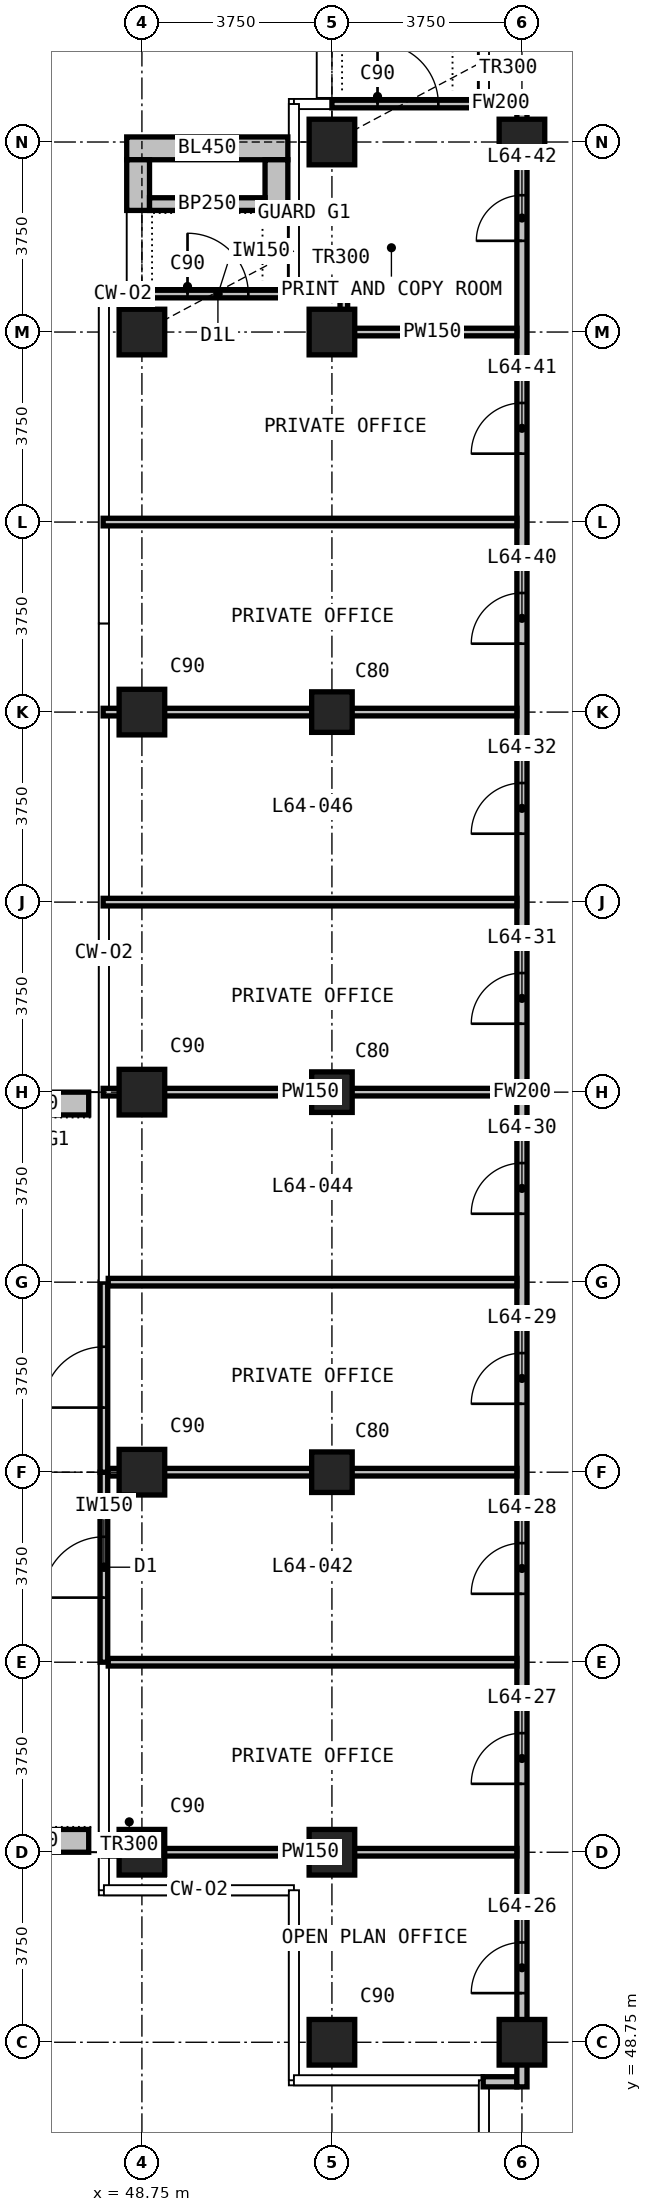
"""IFC4 building model, lengths in metres.
Left out: names, types, materials, properties, quantities, classifications, styles, units other than length and angle.
Written with IfcOpenShell. Run it as: python <this file> out.ifc"""

import sys

from ifc_helpers import new_model, si_unit, direction, frame, frame_2d, origin, origin_2d, place, context, subcontext, project, spatial, rectangle, extrude, element, fill, save


model = new_model("IFC4")
c1 = context("Model", 3, precision=1e-05, world=origin(), true_north=direction((0.0, 1.0)))
c2 = subcontext(c1, "Body", "Model", "MODEL_VIEW")
j1 = project(units=[si_unit("LENGTHUNIT", "METRE"), si_unit("PLANEANGLEUNIT", "RADIAN")], contexts=[c1])
p1 = place(None, origin())
s1 = spatial("IfcSite", under=j1, at=p1, CompositionType="ELEMENT")
p2 = place(p1, origin())
s2 = spatial("IfcBuilding", under=s1, at=p2, CompositionType="ELEMENT")
p3 = place(p2, frame((0.0, 0.0, 246.3)))
s3 = spatial("IfcBuildingStorey", under=s2, at=p3, CompositionType="ELEMENT", Elevation=246.3)
for number, where, z_axis, x_axis in (
    (1, (48.75, 52.5, 0.0), (0.0, 0.0, 1.0), (1.0, 0.0, 0.0)),
    (2, (48.75, 60.0, 0.0), (0.0, 0.0, 1.0), (1.0, 0.0, 0.0)),
    (3, (48.75, 67.5, 0.0), (0.0, 0.0, 1.0), (1.0, 0.0, 0.0)),
    (4, (48.75, 75.0, 0.0), (0.0, 0.0, 1.0), (1.0, 0.0, 0.0)),
    (5, (48.75, 82.5, 0.0), (0.0, 0.0, 1.0), (1.0, 0.0, 0.0)),
    (6, (52.5, 48.75, 0.0), (0.0, 0.0, 1.0), (1.0, 0.0, 0.0)),
    (7, (52.5, 52.5, 0.0), (0.0, 0.0, 1.0), (1.0, 0.0, 0.0)),
):
    element("IfcColumn", number, at=place(p3, frame(where, z_axis=z_axis, x_axis=x_axis)), inside=s3, PredefinedType="COLUMN", context=c2, shape_type="SweptSolid", body=[
        extrude(rectangle(XDim=0.9, YDim=0.9, at=origin_2d()), origin(), (0.0, 0.0, 1.0), 3.6),
    ])
for number, where, z_axis, x_axis in (
    (8, (52.5, 60.0, 0.0), (0.0, 0.0, 1.0), (1.0, 0.0, 0.0)),
    (9, (52.5, 67.5, 0.0), (0.0, 0.0, 1.0), (1.0, 0.0, 0.0)),
    (10, (52.5, 75.0, 0.0), (0.0, 0.0, 1.0), (1.0, 0.0, 0.0)),
):
    element("IfcColumn", number, at=place(p3, frame(where, z_axis=z_axis, x_axis=x_axis)), inside=s3, PredefinedType="COLUMN", context=c2, shape_type="SweptSolid", body=[
        extrude(rectangle(XDim=0.8, YDim=0.8, at=origin_2d()), origin(), (0.0, 0.0, 1.0), 3.6),
    ])
for number, where, z_axis, x_axis in (
    (11, (52.5, 82.5, 0.0), (0.0, 0.0, 1.0), (1.0, 0.0, 0.0)),
    (12, (52.5, 86.25, 0.0), (0.0, 0.0, 1.0), (1.0, 0.0, 0.0)),
    (13, (56.25, 48.75, 0.0), (0.0, 0.0, 1.0), (1.0, 0.0, 0.0)),
    (14, (56.25, 86.25, 0.0), (0.0, 0.0, 1.0), (1.0, 0.0, 0.0)),
):
    element("IfcColumn", number, at=place(p3, frame(where, z_axis=z_axis, x_axis=x_axis)), inside=s3, PredefinedType="COLUMN", context=c2, shape_type="SweptSolid", body=[
        extrude(rectangle(XDim=0.9, YDim=0.9, at=origin_2d()), origin(), (0.0, 0.0, 1.0), 3.6),
    ])
p4 = place(p3, frame((52.5, 87.0, 0.0), z_axis=(0.0, 0.0, 1.0), x_axis=(1.0, 0.0, 0.0)))
e15 = element("IfcWall", 15, at=p4, inside=s3, PredefinedType="SOLIDWALL", context=c2, shape_type="SweptSolid", body=[
    extrude(rectangle(XDim=3.0, YDim=0.15, at=frame_2d((1.5, 0.0))), origin(), (0.0, 0.0, 1.0), 3.3),
])
p5 = place(p4, frame((0.9, 0.0, 0.0)))
e16 = element("IfcOpeningElement", 16, at=p5, cuts=e15, PredefinedType="OPENING", context=c2, shape_type="SweptSolid", body=[
    extrude(rectangle(XDim=1.2, YDim=2.0, at=frame_2d((0.6, 1.0))), frame((0.0, 0.085, 0.0), z_axis=(0.0, -1.0, 0.0), x_axis=(1.0, 0.0, 0.0)), (0.0, 0.0, 1.0), 0.17),
])
p6 = place(p3, frame((48.75, 83.25, 0.0), z_axis=(0.0, 0.0, 1.0), x_axis=(1.0, 0.0, 0.0)))
e17 = element("IfcWall", 17, at=p6, inside=s3, PredefinedType="SOLIDWALL", context=c2, shape_type="SweptSolid", body=[
    extrude(rectangle(XDim=3.0, YDim=0.15, at=frame_2d((1.5, 0.0))), origin(), (0.0, 0.0, 1.0), 3.3),
])
p7 = place(p6, frame((0.9, 0.0, 0.0)))
e18 = element("IfcOpeningElement", 18, at=p7, cuts=e17, PredefinedType="OPENING", context=c2, shape_type="SweptSolid", body=[
    extrude(rectangle(XDim=1.2, YDim=2.0, at=frame_2d((0.6, 1.0))), frame((0.0, 0.085, 0.0), z_axis=(0.0, -1.0, 0.0), x_axis=(1.0, 0.0, 0.0)), (0.0, 0.0, 1.0), 0.17),
])
p8 = place(p3, frame((48.0, 56.25, 0.0), z_axis=(0.0, 0.0, 1.0), x_axis=(0.0, 1.0, 0.0)))
e19 = element("IfcWall", 19, at=p8, inside=s3, PredefinedType="SOLIDWALL", context=c2, shape_type="SweptSolid", body=[
    extrude(rectangle(XDim=3.75, YDim=0.15, at=frame_2d((1.875, 0.0))), origin(), (0.0, 0.0, 1.0), 3.3),
])
p9 = place(p8, frame((1.275, 0.0, 0.0)))
e20 = element("IfcOpeningElement", 20, at=p9, cuts=e19, PredefinedType="OPENING", context=c2, shape_type="SweptSolid", body=[
    extrude(rectangle(XDim=1.2, YDim=2.4, at=frame_2d((0.6, 1.2))), frame((0.0, 0.085, 0.0), z_axis=(0.0, -1.0, 0.0), x_axis=(1.0, 0.0, 0.0)), (0.0, 0.0, 1.0), 0.17),
])
p10 = place(p3, frame((48.0, 60.0, 0.0), z_axis=(0.0, 0.0, 1.0), x_axis=(0.0, 1.0, 0.0)))
e21 = element("IfcWall", 21, at=p10, inside=s3, PredefinedType="SOLIDWALL", context=c2, shape_type="SweptSolid", body=[
    extrude(rectangle(XDim=3.75, YDim=0.15, at=frame_2d((1.875, 0.0))), origin(), (0.0, 0.0, 1.0), 3.3),
])
p11 = place(p10, frame((1.275, 0.0, 0.0)))
e22 = element("IfcOpeningElement", 22, at=p11, cuts=e21, PredefinedType="OPENING", context=c2, shape_type="SweptSolid", body=[
    extrude(rectangle(XDim=1.2, YDim=2.4, at=frame_2d((0.6, 1.2))), frame((0.0, 0.085, 0.0), z_axis=(0.0, -1.0, 0.0), x_axis=(1.0, 0.0, 0.0)), (0.0, 0.0, 1.0), 0.17),
])
p12 = place(p3, frame((48.45, 86.125, 0.0), z_axis=(0.0, 0.0, 1.0), x_axis=(1.0, 0.0, 0.0)))
e23 = element("IfcWall", 23, at=p12, inside=s3, PredefinedType="USERDEFINED", context=c2, shape_type="SweptSolid", body=[
    extrude(rectangle(XDim=3.18, YDim=0.45, at=frame_2d((1.59, 0.0))), origin(), (0.0, 0.0, 1.0), 1.1),
])
for number, where, z_axis, x_axis in (
    (24, (48.675, 84.9, 0.0), (0.0, 0.0, 1.0), (0.0, 1.0, 0.0)),
    (25, (51.405, 84.9, 0.0), (0.0, 0.0, 1.0), (0.0, 1.0, 0.0)),
):
    element("IfcWall", number, at=place(p3, frame(where, z_axis=z_axis, x_axis=x_axis)), inside=s3, PredefinedType="USERDEFINED", context=c2, shape_type="SweptSolid", body=[
        extrude(rectangle(XDim=1.0, YDim=0.45, at=frame_2d((0.5, 0.0))), origin(), (0.0, 0.0, 1.0), 1.1),
    ])
p13 = place(p3, frame((48.9, 85.025, 0.0), z_axis=(0.0, 0.0, 1.0), x_axis=(1.0, 0.0, 0.0)))
e26 = element("IfcWall", 26, at=p13, inside=s3, PredefinedType="USERDEFINED", context=c2, shape_type="SweptSolid", body=[
    extrude(rectangle(XDim=2.28, YDim=0.25, at=frame_2d((1.14, 0.0))), origin(), (0.0, 0.0, 1.0), 1.0),
])
for number, where, z_axis, x_axis in (
    (27, (47.7, 52.725, 0.0), (0.0, 0.0, 1.0), (-1.0, 0.0, 0.0)),
    (28, (47.7, 67.275, 0.0), (0.0, 0.0, 1.0), (-1.0, 0.0, 0.0)),
):
    element("IfcWall", number, at=place(p3, frame(where, z_axis=z_axis, x_axis=x_axis)), inside=s3, PredefinedType="USERDEFINED", context=c2, shape_type="SweptSolid", body=[
        extrude(rectangle(XDim=2.35, YDim=0.45, at=frame_2d((1.175, 0.0))), origin(), (0.0, 0.0, 1.0), 1.1),
    ])
p14 = place(p3, frame((55.485, 47.97, 0.0), z_axis=(0.0, 0.0, 1.0), x_axis=(1.0, 0.0, 0.0)))
e29 = element("IfcWall", 29, at=p14, inside=s3, PredefinedType="PARTITIONING", context=c2, shape_type="SweptSolid", body=[
    extrude(rectangle(XDim=0.665, YDim=0.2, at=frame_2d((0.333, 0.0))), origin(), (0.0, 0.0, 1.0), 3.3),
])
p15 = place(p3, frame((55.51, 87.03, 0.0), z_axis=(0.0, 0.0, 1.0), x_axis=(1.0, 0.0, 0.0)))
e30 = element("IfcWall", 30, at=p15, inside=s3, PredefinedType="PARTITIONING", context=c2, shape_type="SweptSolid", body=[
    extrude(rectangle(XDim=0.64, YDim=0.2, at=frame_2d((0.32, 0.0))), origin(), (0.0, 0.0, 1.0), 3.3),
])
p16 = place(p3, frame((56.25, 47.87, 0.0), z_axis=(0.0, 0.0, 1.0), x_axis=(0.0, 1.0, 0.0)))
e31 = element("IfcWall", 31, at=p16, inside=s3, PredefinedType="PARTITIONING", context=c2, shape_type="SweptSolid", body=[
    extrude(rectangle(XDim=39.26, YDim=0.2, at=frame_2d((19.63, 0.0))), origin(), (0.0, 0.0, 1.0), 3.3),
])
p17 = place(p16, frame((1.85, 0.0, 0.0)))
e32 = element("IfcOpeningElement", 32, at=p17, cuts=e31, PredefinedType="OPENING", context=c2, shape_type="SweptSolid", body=[
    extrude(rectangle(XDim=1.0, YDim=2.2, at=frame_2d((0.5, 1.1))), frame((0.0, 0.11, 0.0), z_axis=(0.0, -1.0, 0.0), x_axis=(1.0, 0.0, 0.0)), (0.0, 0.0, 1.0), 0.22),
])
p18 = place(p16, frame((5.98, 0.0, 0.0)))
e33 = element("IfcOpeningElement", 33, at=p18, cuts=e31, PredefinedType="OPENING", context=c2, shape_type="SweptSolid", body=[
    extrude(rectangle(XDim=1.0, YDim=2.2, at=frame_2d((0.5, 1.1))), frame((0.0, 0.11, 0.0), z_axis=(0.0, -1.0, 0.0), x_axis=(1.0, 0.0, 0.0)), (0.0, 0.0, 1.0), 0.22),
])
p19 = place(p16, frame((9.73, 0.0, 0.0)))
e34 = element("IfcOpeningElement", 34, at=p19, cuts=e31, PredefinedType="OPENING", context=c2, shape_type="SweptSolid", body=[
    extrude(rectangle(XDim=1.0, YDim=2.2, at=frame_2d((0.5, 1.1))), frame((0.0, 0.11, 0.0), z_axis=(0.0, -1.0, 0.0), x_axis=(1.0, 0.0, 0.0)), (0.0, 0.0, 1.0), 0.22),
])
p20 = place(p16, frame((13.48, 0.0, 0.0)))
e35 = element("IfcOpeningElement", 35, at=p20, cuts=e31, PredefinedType="OPENING", context=c2, shape_type="SweptSolid", body=[
    extrude(rectangle(XDim=1.0, YDim=2.2, at=frame_2d((0.5, 1.1))), frame((0.0, 0.11, 0.0), z_axis=(0.0, -1.0, 0.0), x_axis=(1.0, 0.0, 0.0)), (0.0, 0.0, 1.0), 0.22),
])
p21 = place(p16, frame((17.23, 0.0, 0.0)))
e36 = element("IfcOpeningElement", 36, at=p21, cuts=e31, PredefinedType="OPENING", context=c2, shape_type="SweptSolid", body=[
    extrude(rectangle(XDim=1.0, YDim=2.2, at=frame_2d((0.5, 1.1))), frame((0.0, 0.11, 0.0), z_axis=(0.0, -1.0, 0.0), x_axis=(1.0, 0.0, 0.0)), (0.0, 0.0, 1.0), 0.22),
])
p22 = place(p16, frame((20.98, 0.0, 0.0)))
e37 = element("IfcOpeningElement", 37, at=p22, cuts=e31, PredefinedType="OPENING", context=c2, shape_type="SweptSolid", body=[
    extrude(rectangle(XDim=1.0, YDim=2.2, at=frame_2d((0.5, 1.1))), frame((0.0, 0.11, 0.0), z_axis=(0.0, -1.0, 0.0), x_axis=(1.0, 0.0, 0.0)), (0.0, 0.0, 1.0), 0.22),
])
p23 = place(p16, frame((24.73, 0.0, 0.0)))
e38 = element("IfcOpeningElement", 38, at=p23, cuts=e31, PredefinedType="OPENING", context=c2, shape_type="SweptSolid", body=[
    extrude(rectangle(XDim=1.0, YDim=2.2, at=frame_2d((0.5, 1.1))), frame((0.0, 0.11, 0.0), z_axis=(0.0, -1.0, 0.0), x_axis=(1.0, 0.0, 0.0)), (0.0, 0.0, 1.0), 0.22),
])
p24 = place(p16, frame((28.48, 0.0, 0.0)))
e39 = element("IfcOpeningElement", 39, at=p24, cuts=e31, PredefinedType="OPENING", context=c2, shape_type="SweptSolid", body=[
    extrude(rectangle(XDim=1.0, YDim=2.2, at=frame_2d((0.5, 1.1))), frame((0.0, 0.11, 0.0), z_axis=(0.0, -1.0, 0.0), x_axis=(1.0, 0.0, 0.0)), (0.0, 0.0, 1.0), 0.22),
])
p25 = place(p16, frame((32.23, 0.0, 0.0)))
e40 = element("IfcOpeningElement", 40, at=p25, cuts=e31, PredefinedType="OPENING", context=c2, shape_type="SweptSolid", body=[
    extrude(rectangle(XDim=1.0, YDim=2.2, at=frame_2d((0.5, 1.1))), frame((0.0, 0.11, 0.0), z_axis=(0.0, -1.0, 0.0), x_axis=(1.0, 0.0, 0.0)), (0.0, 0.0, 1.0), 0.22),
])
p26 = place(p16, frame((36.43, 0.0, 0.0)))
e41 = element("IfcOpeningElement", 41, at=p26, cuts=e31, PredefinedType="OPENING", context=c2, shape_type="SweptSolid", body=[
    extrude(rectangle(XDim=0.9, YDim=2.2, at=frame_2d((0.45, 1.1))), frame((0.0, 0.11, 0.0), z_axis=(0.0, -1.0, 0.0), x_axis=(1.0, 0.0, 0.0)), (0.0, 0.0, 1.0), 0.22),
])
p27 = place(p3, frame((47.985, 52.5, 0.0), z_axis=(0.0, 0.0, 1.0), x_axis=(1.0, 0.0, 0.0)))
e42 = element("IfcWall", 42, at=p27, inside=s3, PredefinedType="PARTITIONING", context=c2, shape_type="SweptSolid", body=[
    extrude(rectangle(XDim=8.165, YDim=0.15, at=frame_2d((4.083, 0.0))), origin(), (0.0, 0.0, 1.0), 3.3),
])
for number, where, z_axis, x_axis in (
    (43, (48.085, 56.25, 0.0), (0.0, 0.0, 1.0), (1.0, 0.0, 0.0)),
    (44, (48.085, 60.0, 0.0), (0.0, 0.0, 1.0), (1.0, 0.0, 0.0)),
    (45, (48.085, 63.75, 0.0), (0.0, 0.0, 1.0), (1.0, 0.0, 0.0)),
):
    element("IfcWall", number, at=place(p3, frame(where, z_axis=z_axis, x_axis=x_axis)), inside=s3, PredefinedType="PARTITIONING", context=c2, shape_type="SweptSolid", body=[
        extrude(rectangle(XDim=8.065, YDim=0.15, at=frame_2d((4.032, 0.0))), origin(), (0.0, 0.0, 1.0), 3.3),
    ])
for number, where, z_axis, x_axis in (
    (46, (47.985, 67.5, 0.0), (0.0, 0.0, 1.0), (1.0, 0.0, 0.0)),
    (47, (47.985, 71.25, 0.0), (0.0, 0.0, 1.0), (1.0, 0.0, 0.0)),
    (48, (47.985, 75.0, 0.0), (0.0, 0.0, 1.0), (1.0, 0.0, 0.0)),
    (49, (47.985, 78.75, 0.0), (0.0, 0.0, 1.0), (1.0, 0.0, 0.0)),
):
    element("IfcWall", number, at=place(p3, frame(where, z_axis=z_axis, x_axis=x_axis)), inside=s3, PredefinedType="PARTITIONING", context=c2, shape_type="SweptSolid", body=[
        extrude(rectangle(XDim=8.165, YDim=0.15, at=frame_2d((4.083, 0.0))), origin(), (0.0, 0.0, 1.0), 3.3),
    ])
p28 = place(p3, frame((52.81, 82.5, 0.0), z_axis=(0.0, 0.0, 1.0), x_axis=(1.0, 0.0, 0.0)))
e50 = element("IfcWall", 50, at=p28, inside=s3, PredefinedType="PARTITIONING", context=c2, shape_type="SweptSolid", body=[
    extrude(rectangle(XDim=3.34, YDim=0.15, at=frame_2d((1.67, 0.0))), origin(), (0.0, 0.0, 1.0), 3.3),
])
p29 = place(p3, frame((51.76, 83.265, 0.0), z_axis=(0.0, 0.0, 1.0), x_axis=(1.0, 0.0, 0.0)))
e51 = element("IfcWall", 51, at=p29, inside=s3, PredefinedType="PARTITIONING", context=c2, shape_type="SweptSolid", body=[
    extrude(rectangle(XDim=0.9, YDim=0.15, at=frame_2d((0.45, 0.0))), origin(), (0.0, 0.0, 1.0), 3.3),
])
p30 = place(p3, frame((52.735, 82.425, 0.0), z_axis=(0.0, 0.0, 1.0), x_axis=(0.0, 1.0, 0.0)))
e52 = element("IfcWall", 52, at=p30, inside=s3, PredefinedType="PARTITIONING", context=c2, shape_type="SweptSolid", body=[
    extrude(rectangle(XDim=0.915, YDim=0.15, at=frame_2d((0.458, 0.0))), origin(), (0.0, 0.0, 1.0), 3.3),
])
p31 = place(p5, origin())
e53 = element("IfcDoor", 53, at=p31, inside=s3, OperationType="SINGLE_SWING_LEFT", PredefinedType="DOOR", context=c2, shape_type="SweptSolid", body=[
    extrude(rectangle(XDim=1.2, YDim=2.0, at=frame_2d((0.6, 1.0))), frame((0.0, 0.025, 0.0), z_axis=(0.0, -1.0, 0.0), x_axis=(1.0, 0.0, 0.0)), (0.0, 0.0, 1.0), 0.05),
])
fill(e16, e53)
p32 = place(p7, origin())
e54 = element("IfcDoor", 54, at=p32, inside=s3, OperationType="SINGLE_SWING_LEFT", PredefinedType="DOOR", context=c2, shape_type="SweptSolid", body=[
    extrude(rectangle(XDim=1.2, YDim=2.0, at=frame_2d((0.6, 1.0))), frame((0.0, 0.025, 0.0), z_axis=(0.0, -1.0, 0.0), x_axis=(1.0, 0.0, 0.0)), (0.0, 0.0, 1.0), 0.05),
])
fill(e18, e54)
p33 = place(p9, origin())
e55 = element("IfcDoor", 55, at=p33, inside=s3, OperationType="SINGLE_SWING_LEFT", PredefinedType="DOOR", context=c2, shape_type="SweptSolid", body=[
    extrude(rectangle(XDim=1.2, YDim=2.4, at=frame_2d((0.6, 1.2))), frame((0.0, 0.025, 0.0), z_axis=(0.0, -1.0, 0.0), x_axis=(1.0, 0.0, 0.0)), (0.0, 0.0, 1.0), 0.05),
])
fill(e20, e55)
p34 = place(p11, origin())
e56 = element("IfcDoor", 56, at=p34, inside=s3, OperationType="SINGLE_SWING_LEFT", PredefinedType="DOOR", context=c2, shape_type="SweptSolid", body=[
    extrude(rectangle(XDim=1.2, YDim=2.4, at=frame_2d((0.6, 1.2))), frame((0.0, 0.025, 0.0), z_axis=(0.0, -1.0, 0.0), x_axis=(1.0, 0.0, 0.0)), (0.0, 0.0, 1.0), 0.05),
])
fill(e22, e56)
p35 = place(p17, origin())
e57 = element("IfcDoor", 57, at=p35, inside=s3, OperationType="SINGLE_SWING_RIGHT", PredefinedType="DOOR", context=c2, shape_type="SweptSolid", body=[
    extrude(rectangle(XDim=1.0, YDim=2.2, at=frame_2d((0.5, 1.1))), frame((0.0, 0.025, 0.0), z_axis=(0.0, -1.0, 0.0), x_axis=(1.0, 0.0, 0.0)), (0.0, 0.0, 1.0), 0.05),
])
fill(e32, e57)
p36 = place(p18, origin())
e58 = element("IfcDoor", 58, at=p36, inside=s3, OperationType="SINGLE_SWING_RIGHT", PredefinedType="DOOR", context=c2, shape_type="SweptSolid", body=[
    extrude(rectangle(XDim=1.0, YDim=2.2, at=frame_2d((0.5, 1.1))), frame((0.0, 0.025, 0.0), z_axis=(0.0, -1.0, 0.0), x_axis=(1.0, 0.0, 0.0)), (0.0, 0.0, 1.0), 0.05),
])
fill(e33, e58)
p37 = place(p19, origin())
e59 = element("IfcDoor", 59, at=p37, inside=s3, OperationType="SINGLE_SWING_RIGHT", PredefinedType="DOOR", context=c2, shape_type="SweptSolid", body=[
    extrude(rectangle(XDim=1.0, YDim=2.2, at=frame_2d((0.5, 1.1))), frame((0.0, 0.025, 0.0), z_axis=(0.0, -1.0, 0.0), x_axis=(1.0, 0.0, 0.0)), (0.0, 0.0, 1.0), 0.05),
])
fill(e34, e59)
p38 = place(p20, origin())
e60 = element("IfcDoor", 60, at=p38, inside=s3, OperationType="SINGLE_SWING_LEFT", PredefinedType="DOOR", context=c2, shape_type="SweptSolid", body=[
    extrude(rectangle(XDim=1.0, YDim=2.2, at=frame_2d((0.5, 1.1))), frame((0.0, 0.025, 0.0), z_axis=(0.0, -1.0, 0.0), x_axis=(1.0, 0.0, 0.0)), (0.0, 0.0, 1.0), 0.05),
])
fill(e35, e60)
p39 = place(p21, origin())
e61 = element("IfcDoor", 61, at=p39, inside=s3, OperationType="SINGLE_SWING_RIGHT", PredefinedType="DOOR", context=c2, shape_type="SweptSolid", body=[
    extrude(rectangle(XDim=1.0, YDim=2.2, at=frame_2d((0.5, 1.1))), frame((0.0, 0.025, 0.0), z_axis=(0.0, -1.0, 0.0), x_axis=(1.0, 0.0, 0.0)), (0.0, 0.0, 1.0), 0.05),
])
fill(e36, e61)
p40 = place(p22, origin())
e62 = element("IfcDoor", 62, at=p40, inside=s3, OperationType="SINGLE_SWING_RIGHT", PredefinedType="DOOR", context=c2, shape_type="SweptSolid", body=[
    extrude(rectangle(XDim=1.0, YDim=2.2, at=frame_2d((0.5, 1.1))), frame((0.0, 0.025, 0.0), z_axis=(0.0, -1.0, 0.0), x_axis=(1.0, 0.0, 0.0)), (0.0, 0.0, 1.0), 0.05),
])
fill(e37, e62)
p41 = place(p23, origin())
e63 = element("IfcDoor", 63, at=p41, inside=s3, OperationType="SINGLE_SWING_LEFT", PredefinedType="DOOR", context=c2, shape_type="SweptSolid", body=[
    extrude(rectangle(XDim=1.0, YDim=2.2, at=frame_2d((0.5, 1.1))), frame((0.0, 0.025, 0.0), z_axis=(0.0, -1.0, 0.0), x_axis=(1.0, 0.0, 0.0)), (0.0, 0.0, 1.0), 0.05),
])
fill(e38, e63)
p42 = place(p24, origin())
e64 = element("IfcDoor", 64, at=p42, inside=s3, OperationType="SINGLE_SWING_LEFT", PredefinedType="DOOR", context=c2, shape_type="SweptSolid", body=[
    extrude(rectangle(XDim=1.0, YDim=2.2, at=frame_2d((0.5, 1.1))), frame((0.0, 0.025, 0.0), z_axis=(0.0, -1.0, 0.0), x_axis=(1.0, 0.0, 0.0)), (0.0, 0.0, 1.0), 0.05),
])
fill(e39, e64)
p43 = place(p25, origin())
e65 = element("IfcDoor", 65, at=p43, inside=s3, OperationType="SINGLE_SWING_LEFT", PredefinedType="DOOR", context=c2, shape_type="SweptSolid", body=[
    extrude(rectangle(XDim=1.0, YDim=2.2, at=frame_2d((0.5, 1.1))), frame((0.0, 0.025, 0.0), z_axis=(0.0, -1.0, 0.0), x_axis=(1.0, 0.0, 0.0)), (0.0, 0.0, 1.0), 0.05),
])
fill(e40, e65)
p44 = place(p26, origin())
e66 = element("IfcDoor", 66, at=p44, inside=s3, OperationType="SINGLE_SWING_RIGHT", PredefinedType="DOOR", context=c2, shape_type="SweptSolid", body=[
    extrude(rectangle(XDim=0.9, YDim=2.2, at=frame_2d((0.45, 1.1))), frame((0.0, 0.025, 0.0), z_axis=(0.0, -1.0, 0.0), x_axis=(1.0, 0.0, 0.0)), (0.0, 0.0, 1.0), 0.05),
])
fill(e41, e66)
save(model, sys.argv[1])
